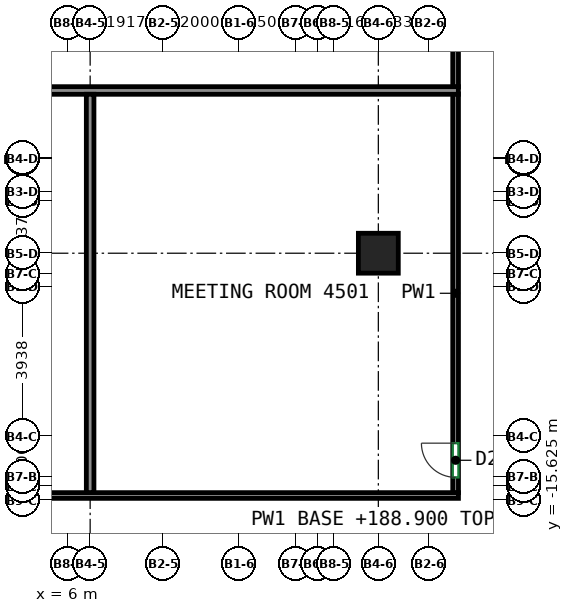
"""IFC4 building model, lengths in metres.
Left out: names, types, materials, properties, quantities, classifications, styles, units other than length and angle.
Written with IfcOpenShell. Run it as: python <this file> out.ifc"""

import sys

from ifc_helpers import new_model, si_unit, direction, frame, frame_2d, origin, origin_2d, place, context, subcontext, project, spatial, rectangle, extrude, source, transform, mapped, element, fill, save


model = new_model("IFC4")
c1 = context("Model", 3, precision=1e-05, world=origin(), true_north=direction((0.0, 1.0)))
c2 = subcontext(c1, "Body", "Model", "MODEL_VIEW")
j1 = project(units=[si_unit("LENGTHUNIT", "METRE"), si_unit("PLANEANGLEUNIT", "RADIAN")], contexts=[c1])
p1 = place(None, origin())
s1 = spatial("IfcSite", under=j1, at=p1, CompositionType="ELEMENT")
p2 = place(p1, origin())
s2 = spatial("IfcBuilding", under=s1, at=p2, CompositionType="ELEMENT")
p3 = place(p2, frame((0.0, 0.0, 188.9)))
s3 = spatial("IfcBuildingStorey", under=s2, at=p3, CompositionType="ELEMENT", Elevation=188.9)
m1 = source(origin(), c2, "Body", "SweptSolid", [
    extrude(rectangle(XDim=1.05, YDim=1.05, at=origin_2d()), origin(), (0.0, 0.0, 1.0), 3.12),
])
p4 = place(p3, frame((14.167, -9.125, 0.0), z_axis=(0.0, 0.0, 1.0), x_axis=(1.0, 0.0, 0.0)))
e1 = element("IfcColumn", 1, at=p4, inside=s3, PredefinedType="COLUMN", context=c2, shape_type="MappedRepresentation", body=[
    mapped(m1, transform((0.0, 0.0, 0.0))),
])
p5 = place(p3, frame((16.2, -4.753, 0.0), z_axis=(0.0, 0.0, 1.0), x_axis=(0.0, 1.0, 0.0)))
e2 = element("IfcWall", 2, at=p5, inside=s3, PredefinedType="PARTITIONING", context=c2, shape_type="SweptSolid", body=[
    extrude(rectangle(XDim=8.378, YDim=0.15, at=frame_2d((4.189, 0.0))), origin(), (0.0, 0.0, 1.0), 3.12),
])
p6 = place(p3, frame((-8.593, -15.5, 0.0), z_axis=(0.0, 0.0, 1.0), x_axis=(1.0, 0.0, 0.0)))
e3 = element("IfcWall", 3, at=p6, inside=s3, PredefinedType="PARTITIONING", context=c2, shape_type="SweptSolid", body=[
    extrude(rectangle(XDim=24.868, YDim=0.15, at=frame_2d((12.434, 0.0))), origin(), (0.0, 0.0, 1.0), 3.12),
])
p7 = place(p6, frame((11.973, 0.0, 0.0)))
e4 = element("IfcOpeningElement", 4, at=p7, cuts=e3, PredefinedType="OPENING", context=c2, shape_type="SweptSolid", body=[
    extrude(rectangle(XDim=0.9, YDim=2.1, at=frame_2d((0.45, 1.05))), frame((0.0, 0.085, 0.0), z_axis=(0.0, -1.0, 0.0), x_axis=(1.0, 0.0, 0.0)), (0.0, 0.0, 1.0), 0.17),
])
p8 = place(p3, frame((16.2, -15.425, 0.0), z_axis=(0.0, 0.0, 1.0), x_axis=(0.0, 1.0, 0.0)))
e5 = element("IfcWall", 5, at=p8, inside=s3, PredefinedType="PARTITIONING", context=c2, shape_type="SweptSolid", body=[
    extrude(rectangle(XDim=10.492, YDim=0.15, at=frame_2d((5.246, 0.0))), origin(), (0.0, 0.0, 1.0), 3.12),
])
p9 = place(p8, frame((0.402, 0.0, 0.0)))
e6 = element("IfcOpeningElement", 6, at=p9, cuts=e5, PredefinedType="OPENING", context=c2, shape_type="SweptSolid", body=[
    extrude(rectangle(XDim=0.9, YDim=2.1, at=frame_2d((0.45, 1.05))), frame((0.0, 0.085, 0.0), z_axis=(0.0, -1.0, 0.0), x_axis=(1.0, 0.0, 0.0)), (0.0, 0.0, 1.0), 0.17),
])
p10 = place(p3, frame((-13.873, -4.843, 0.0), z_axis=(0.0, 0.0, 1.0), x_axis=(1.0, 0.0, 0.0)))
e7 = element("IfcWall", 7, at=p10, inside=s3, PredefinedType="PARTITIONING", context=c2, shape_type="SweptSolid", body=[
    extrude(rectangle(XDim=30.146, YDim=0.2, at=frame_2d((15.073, 0.0))), origin(), (0.0, 0.0, 1.0), 3.12),
])
p11 = place(p3, frame((6.583, -15.423, 0.0), z_axis=(0.0, 0.0, 1.0), x_axis=(0.0, 1.0, 0.0)))
e8 = element("IfcWall", 8, at=p11, inside=s3, PredefinedType="PARTITIONING", context=c2, shape_type="SweptSolid", body=[
    extrude(rectangle(XDim=10.48, YDim=0.2, at=frame_2d((5.24, 0.0))), origin(), (0.0, 0.0, 1.0), 3.12),
])
p12 = place(p9, origin())
e9 = element("IfcDoor", 9, at=p12, inside=s3, OperationType="SINGLE_SWING_RIGHT", PredefinedType="DOOR", context=c2, shape_type="SweptSolid", body=[
    extrude(rectangle(XDim=0.9, YDim=2.1, at=frame_2d((0.45, 1.05))), frame((0.0, 0.025, 0.0), z_axis=(0.0, -1.0, 0.0), x_axis=(1.0, 0.0, 0.0)), (0.0, 0.0, 1.0), 0.05),
])
fill(e6, e9)
save(model, sys.argv[1])
